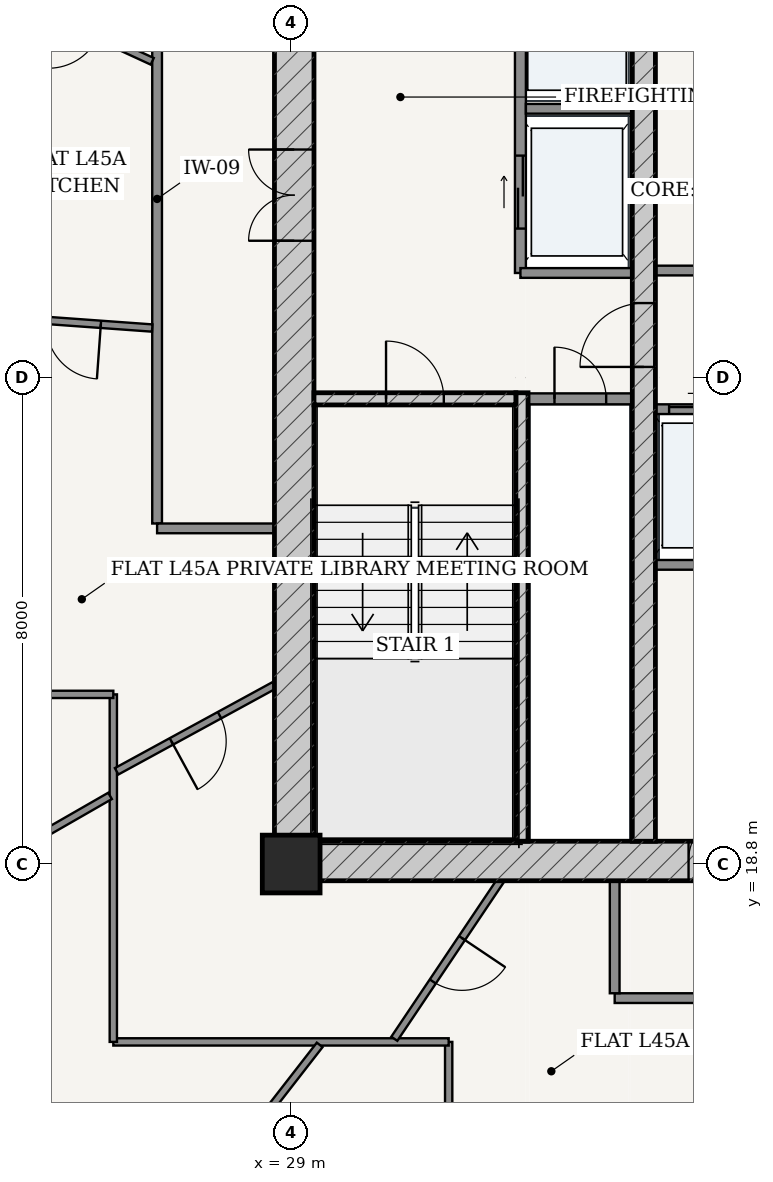
"""IFC4 building model, lengths in metres.
Left out: names, types, materials, properties, quantities, classifications, styles, units other than length and angle.
Written with IfcOpenShell. Run it as: python <this file> out.ifc"""

import sys

from ifc_helpers import new_model, si_unit, direction, frame, frame_2d, origin, origin_2d, place, context, subcontext, project, spatial, rectangle, extrude, source, transform, mapped, element, fill, save


model = new_model("IFC4")
c1 = context("Model", 3, precision=1e-05, world=origin(), true_north=direction((-0.2419218956, 0.970295726276)))
c2 = subcontext(c1, "Body", "Model", "MODEL_VIEW")
j1 = project(units=[si_unit("LENGTHUNIT", "METRE"), si_unit("PLANEANGLEUNIT", "RADIAN")], contexts=[c1])
p1 = place(None, origin())
s1 = spatial("IfcSite", under=j1, at=p1, CompositionType="ELEMENT")
p2 = place(p1, origin())
s2 = spatial("IfcBuilding", under=s1, at=p2, CompositionType="ELEMENT")
p3 = place(p2, frame((0.0, 0.0, 171.4)))
s3 = spatial("IfcBuildingStorey", under=s2, at=p3, CompositionType="ELEMENT", Elevation=171.4)
p4 = place(p3, frame((29.0, 18.8, 0.0), z_axis=(0.0, 0.0, 1.0), x_axis=(1.0, 0.0, 0.0)))
e1 = element("IfcColumn", 1, at=p4, inside=s3, PredefinedType="COLUMN", context=c2, shape_type="SweptSolid", body=[
    extrude(rectangle(XDim=0.95, YDim=0.95, at=origin_2d()), origin(), (0.0, 0.0, 1.0), 3.6),
])
p5 = place(p3, frame((28.725, 18.85, 0.0), z_axis=(0.0, 0.0, 1.0), x_axis=(1.0, 0.0, 0.0)))
e2 = element("IfcWall", 2, at=p5, inside=s3, PredefinedType="SHEAR", context=c2, shape_type="SweptSolid", body=[
    extrude(rectangle(XDim=18.55, YDim=0.65, at=frame_2d((9.275, 0.0))), origin(), (0.0, 0.0, 1.0), 3.33),
])
p6 = place(p5, frame((6.81, 0.0, 0.0)))
e3 = element("IfcOpeningElement", 3, at=p6, cuts=e2, PredefinedType="OPENING", context=c2, shape_type="SweptSolid", body=[
    extrude(rectangle(XDim=0.85, YDim=2.1, at=frame_2d((0.425, 1.05))), frame((0.0, 0.335, 0.0), z_axis=(0.0, -1.0, 0.0), x_axis=(1.0, 0.0, 0.0)), (0.0, 0.0, 1.0), 0.67),
])
p7 = place(p5, frame((8.85, 0.0, 0.0)))
e4 = element("IfcOpeningElement", 4, at=p7, cuts=e2, PredefinedType="OPENING", context=c2, shape_type="SweptSolid", body=[
    extrude(rectangle(XDim=0.85, YDim=2.1, at=frame_2d((0.425, 1.05))), frame((0.0, 0.335, 0.0), z_axis=(0.0, -1.0, 0.0), x_axis=(1.0, 0.0, 0.0)), (0.0, 0.0, 1.0), 0.67),
])
p8 = place(p5, frame((10.89, 0.0, 0.0)))
e5 = element("IfcOpeningElement", 5, at=p8, cuts=e2, PredefinedType="OPENING", context=c2, shape_type="SweptSolid", body=[
    extrude(rectangle(XDim=0.85, YDim=2.1, at=frame_2d((0.425, 1.05))), frame((0.0, 0.335, 0.0), z_axis=(0.0, -1.0, 0.0), x_axis=(1.0, 0.0, 0.0)), (0.0, 0.0, 1.0), 0.67),
])
p9 = place(p3, frame((29.05, 19.175, 0.0), z_axis=(0.0, 0.0, 1.0), x_axis=(0.0, 1.0, 0.0)))
e6 = element("IfcWall", 6, at=p9, inside=s3, PredefinedType="SHEAR", context=c2, shape_type="SweptSolid", body=[
    extrude(rectangle(XDim=15.25, YDim=0.65, at=frame_2d((7.625, 0.0))), origin(), (0.0, 0.0, 1.0), 3.33),
])
p10 = place(p9, frame((9.875, 0.0, 0.0)))
e7 = element("IfcOpeningElement", 7, at=p10, cuts=e6, PredefinedType="OPENING", context=c2, shape_type="SweptSolid", body=[
    extrude(rectangle(XDim=1.5, YDim=2.2, at=frame_2d((0.75, 1.1))), frame((0.0, 0.335, 0.0), z_axis=(0.0, -1.0, 0.0), x_axis=(1.0, 0.0, 0.0)), (0.0, 0.0, 1.0), 0.67),
])
p11 = place(p3, frame((32.795, 19.175, 0.0), z_axis=(0.0, 0.0, 1.0), x_axis=(0.0, 1.0, 0.0)))
e8 = element("IfcWall", 8, at=p11, inside=s3, PredefinedType="SOLIDWALL", context=c2, shape_type="SweptSolid", body=[
    extrude(rectangle(XDim=7.375, YDim=0.2, at=frame_2d((3.688, 0.0))), origin(), (0.0, 0.0, 1.0), 3.33),
])
p12 = place(p3, frame((29.375, 26.45, 0.0), z_axis=(0.0, 0.0, 1.0), x_axis=(1.0, 0.0, 0.0)))
e9 = element("IfcWall", 9, at=p12, inside=s3, PredefinedType="SOLIDWALL", context=c2, shape_type="SweptSolid", body=[
    extrude(rectangle(XDim=3.32, YDim=0.2, at=frame_2d((1.66, 0.0))), origin(), (0.0, 0.0, 1.0), 3.33),
])
p13 = place(p12, frame((1.185, 0.0, 0.0)))
e10 = element("IfcOpeningElement", 10, at=p13, cuts=e9, PredefinedType="OPENING", context=c2, shape_type="SweptSolid", body=[
    extrude(rectangle(XDim=0.95, YDim=2.15, at=frame_2d((0.475, 1.075))), frame((0.0, 0.11, 0.0), z_axis=(0.0, -1.0, 0.0), x_axis=(1.0, 0.0, 0.0)), (0.0, 0.0, 1.0), 0.22),
])
p14 = place(p3, frame((34.8, 19.175, 0.0), z_axis=(0.0, 0.0, 1.0), x_axis=(0.0, 1.0, 0.0)))
e11 = element("IfcWall", 11, at=p14, inside=s3, PredefinedType="SHEAR", context=c2, shape_type="SweptSolid", body=[
    extrude(rectangle(XDim=15.25, YDim=0.38, at=frame_2d((7.625, 0.0))), origin(), (0.0, 0.0, 1.0), 3.33),
])
p15 = place(p14, frame((7.8, 0.0, 0.0)))
e12 = element("IfcOpeningElement", 12, at=p15, cuts=e11, PredefinedType="OPENING", context=c2, shape_type="SweptSolid", body=[
    extrude(rectangle(XDim=1.05, YDim=2.15, at=frame_2d((0.525, 1.075))), frame((0.0, 0.2, 0.0), z_axis=(0.0, -1.0, 0.0), x_axis=(1.0, 0.0, 0.0)), (0.0, 0.0, 1.0), 0.4),
])
p16 = place(p3, frame((32.9, 26.45, 0.0), z_axis=(0.0, 0.0, 1.0), x_axis=(1.0, 0.0, 0.0)))
e13 = element("IfcWall", 13, at=p16, inside=s3, PredefinedType="PARTITIONING", context=c2, shape_type="SweptSolid", body=[
    extrude(rectangle(XDim=1.71, YDim=0.18, at=frame_2d((0.855, 0.0))), origin(), (0.0, 0.0, 1.0), 3.33),
])
p17 = place(p16, frame((0.43, 0.0, 0.0)))
e14 = element("IfcOpeningElement", 14, at=p17, cuts=e13, PredefinedType="OPENING", context=c2, shape_type="SweptSolid", body=[
    extrude(rectangle(XDim=0.85, YDim=2.1, at=frame_2d((0.425, 1.05))), frame((0.0, 0.1, 0.0), z_axis=(0.0, -1.0, 0.0), x_axis=(1.0, 0.0, 0.0)), (0.0, 0.0, 1.0), 0.2),
])
p18 = place(p3, frame((32.77, 28.52, 0.0), z_axis=(0.0, 0.0, 1.0), x_axis=(0.0, 1.0, 0.0)))
e15 = element("IfcWall", 15, at=p18, inside=s3, PredefinedType="PARTITIONING", context=c2, shape_type="SweptSolid", body=[
    extrude(rectangle(XDim=5.905, YDim=0.18, at=frame_2d((2.953, 0.0))), origin(), (0.0, 0.0, 1.0), 3.33),
])
p19 = place(p18, frame((3.655, 0.0, 0.0)))
e16 = element("IfcOpeningElement", 16, at=p19, cuts=e15, PredefinedType="OPENING", context=c2, shape_type="SweptSolid", body=[
    extrude(rectangle(XDim=1.15, YDim=2.2, at=frame_2d((0.575, 1.1))), frame((0.0, 0.1, 0.0), z_axis=(0.0, -1.0, 0.0), x_axis=(1.0, 0.0, 0.0)), (0.0, 0.0, 1.0), 0.2),
])
p20 = place(p18, frame((0.73, 0.0, 0.0)))
e17 = element("IfcOpeningElement", 17, at=p20, cuts=e15, PredefinedType="OPENING", context=c2, shape_type="SweptSolid", body=[
    extrude(rectangle(XDim=1.2, YDim=2.25, at=frame_2d((0.6, 1.125))), frame((0.0, 0.1, 0.0), z_axis=(0.0, -1.0, 0.0), x_axis=(1.0, 0.0, 0.0)), (0.0, 0.0, 1.0), 0.2),
])
p21 = place(p3, frame((32.86, 31.22, 0.0), z_axis=(0.0, 0.0, 1.0), x_axis=(1.0, 0.0, 0.0)))
e18 = element("IfcWall", 18, at=p21, inside=s3, PredefinedType="PARTITIONING", context=c2, shape_type="SweptSolid", body=[
    extrude(rectangle(XDim=1.75, YDim=0.16, at=frame_2d((0.875, 0.0))), origin(), (0.0, 0.0, 1.0), 3.33),
])
p22 = place(p3, frame((32.77, 28.52, 0.0), z_axis=(0.0, 0.0, 1.0), x_axis=(1.0, 0.0, 0.0)))
e19 = element("IfcWall", 19, at=p22, inside=s3, PredefinedType="PARTITIONING", context=c2, shape_type="SweptSolid", body=[
    extrude(rectangle(XDim=1.84, YDim=0.16, at=frame_2d((0.92, 0.0))), origin(), (0.0, 0.0, 1.0), 3.33),
])
p23 = place(p3, frame((34.99, 28.56, 0.0), z_axis=(0.0, 0.0, 1.0), x_axis=(1.0, 0.0, 0.0)))
e20 = element("IfcWall", 20, at=p23, inside=s3, PredefinedType="PARTITIONING", context=c2, shape_type="SweptSolid", body=[
    extrude(rectangle(XDim=6.02, YDim=0.16, at=frame_2d((3.01, 0.0))), origin(), (0.0, 0.0, 1.0), 3.33),
])
p24 = place(p23, frame((1.025, 0.0, 0.0)))
e21 = element("IfcOpeningElement", 21, at=p24, cuts=e20, PredefinedType="OPENING", context=c2, shape_type="SweptSolid", body=[
    extrude(rectangle(XDim=0.86, YDim=2.1, at=frame_2d((0.43, 1.05))), frame((0.0, 0.09, 0.0), z_axis=(0.0, -1.0, 0.0), x_axis=(1.0, 0.0, 0.0)), (0.0, 0.0, 1.0), 0.18),
])
p25 = place(p23, frame((4.14, 0.0, 0.0)))
e22 = element("IfcOpeningElement", 22, at=p25, cuts=e20, PredefinedType="OPENING", context=c2, shape_type="SweptSolid", body=[
    extrude(rectangle(XDim=0.85, YDim=2.1, at=frame_2d((0.425, 1.05))), frame((0.0, 0.09, 0.0), z_axis=(0.0, -1.0, 0.0), x_axis=(1.0, 0.0, 0.0)), (0.0, 0.0, 1.0), 0.18),
])
p26 = place(p3, frame((34.99, 26.28, 0.0), z_axis=(0.0, 0.0, 1.0), x_axis=(1.0, 0.0, 0.0)))
e23 = element("IfcWall", 23, at=p26, inside=s3, PredefinedType="PARTITIONING", context=c2, shape_type="SweptSolid", body=[
    extrude(rectangle(XDim=6.02, YDim=0.16, at=frame_2d((3.01, 0.0))), origin(), (0.0, 0.0, 1.0), 3.33),
])
p27 = place(p26, frame((0.225, 0.0, 0.0)))
e24 = element("IfcOpeningElement", 24, at=p27, cuts=e23, PredefinedType="OPENING", context=c2, shape_type="SweptSolid", body=[
    extrude(rectangle(XDim=1.1, YDim=2.2, at=frame_2d((0.55, 1.1))), frame((0.0, 0.09, 0.0), z_axis=(0.0, -1.0, 0.0), x_axis=(1.0, 0.0, 0.0)), (0.0, 0.0, 1.0), 0.18),
])
p28 = place(p26, frame((1.705, 0.0, 0.0)))
e25 = element("IfcOpeningElement", 25, at=p28, cuts=e23, PredefinedType="OPENING", context=c2, shape_type="SweptSolid", body=[
    extrude(rectangle(XDim=1.1, YDim=2.2, at=frame_2d((0.55, 1.1))), frame((0.0, 0.09, 0.0), z_axis=(0.0, -1.0, 0.0), x_axis=(1.0, 0.0, 0.0)), (0.0, 0.0, 1.0), 0.18),
])
p29 = place(p3, frame((34.99, 23.72, 0.0), z_axis=(0.0, 0.0, 1.0), x_axis=(1.0, 0.0, 0.0)))
e26 = element("IfcWall", 26, at=p29, inside=s3, PredefinedType="PARTITIONING", context=c2, shape_type="SweptSolid", body=[
    extrude(rectangle(XDim=6.02, YDim=0.16, at=frame_2d((3.01, 0.0))), origin(), (0.0, 0.0, 1.0), 3.33),
])
p30 = place(p3, frame((26.795, 24.4, 0.0), z_axis=(0.0, 0.0, 1.0), x_axis=(0.0, 1.0, 0.0)))
e27 = element("IfcWall", 27, at=p30, inside=s3, PredefinedType="PARTITIONING", context=c2, shape_type="SweptSolid", body=[
    extrude(rectangle(XDim=10.675, YDim=0.16, at=frame_2d((5.337, 0.0))), origin(), (0.0, 0.0, 1.0), 2.776),
])
p31 = place(p30, frame((8.514, 0.0, 0.0)))
e28 = element("IfcOpeningElement", 28, at=p31, cuts=e27, PredefinedType="OPENING", context=c2, shape_type="SweptSolid", body=[
    extrude(rectangle(XDim=0.98, YDim=2.2, at=frame_2d((0.49, 1.1))), frame((0.0, 0.09, 0.0), z_axis=(0.0, -1.0, 0.0), x_axis=(1.0, 0.0, 0.0)), (0.0, 0.0, 1.0), 0.18),
])
p32 = place(p3, frame((26.795, 24.32, 0.0), z_axis=(0.0, 0.0, 1.0), x_axis=(1.0, 0.0, 0.0)))
e29 = element("IfcWall", 29, at=p32, inside=s3, PredefinedType="PARTITIONING", context=c2, shape_type="SweptSolid", body=[
    extrude(rectangle(XDim=1.93, YDim=0.16, at=frame_2d((0.965, 0.0))), origin(), (0.0, 0.0, 1.0), 3.33),
])
p33 = place(p3, frame((34.32, 16.595, 0.0), z_axis=(0.0, 0.0, 1.0), x_axis=(1.0, 0.0, 0.0)))
e30 = element("IfcWall", 30, at=p33, inside=s3, PredefinedType="PARTITIONING", context=c2, shape_type="SweptSolid", body=[
    extrude(rectangle(XDim=14.885, YDim=0.16, at=frame_2d((7.442, 0.0))), origin(), (0.0, 0.0, 1.0), 2.776),
])
p34 = place(p33, frame((11.59, 0.0, 0.0)))
e31 = element("IfcOpeningElement", 31, at=p34, cuts=e30, PredefinedType="OPENING", context=c2, shape_type="SweptSolid", body=[
    extrude(rectangle(XDim=0.98, YDim=2.2, at=frame_2d((0.49, 1.1))), frame((0.0, 0.09, 0.0), z_axis=(0.0, -1.0, 0.0), x_axis=(1.0, 0.0, 0.0)), (0.0, 0.0, 1.0), 0.18),
])
p35 = place(p3, frame((34.32, 16.675, 0.0), z_axis=(0.0, 0.0, 1.0), x_axis=(0.0, 1.0, 0.0)))
e32 = element("IfcWall", 32, at=p35, inside=s3, PredefinedType="PARTITIONING", context=c2, shape_type="SweptSolid", body=[
    extrude(rectangle(XDim=1.85, YDim=0.16, at=frame_2d((0.925, 0.0))), origin(), (0.0, 0.0, 1.0), 3.33),
])
p36 = place(p3, frame((31.59, 13.865, 0.0), z_axis=(0.0, 0.0, 1.0), x_axis=(0.0, 1.0, 0.0)))
e33 = element("IfcWall", 33, at=p36, inside=s3, PredefinedType="PARTITIONING", context=c2, shape_type="SweptSolid", body=[
    extrude(rectangle(XDim=2.01, YDim=0.12, at=frame_2d((1.005, 0.0))), origin(), (0.0, 0.0, 1.0), 3.005),
])
p37 = place(p3, frame((31.59, 15.875, 0.0), z_axis=(0.0, 0.0, 1.0), x_axis=(-1.0, 0.0, 0.0)))
e34 = element("IfcWall", 34, at=p37, inside=s3, PredefinedType="PARTITIONING", context=c2, shape_type="SweptSolid", body=[
    extrude(rectangle(XDim=5.515, YDim=0.12, at=frame_2d((2.758, 0.0))), origin(), (0.0, 0.0, 1.0), 2.776),
])
p38 = place(p3, frame((26.075, 15.875, 0.0), z_axis=(0.0, 0.0, 1.0), x_axis=(0.0, 1.0, 0.0)))
e35 = element("IfcWall", 35, at=p38, inside=s3, PredefinedType="PARTITIONING", context=c2, shape_type="SweptSolid", body=[
    extrude(rectangle(XDim=5.715, YDim=0.12, at=frame_2d((2.857, 0.0))), origin(), (0.0, 0.0, 1.0), 2.776),
])
p39 = place(p3, frame((26.075, 21.59, 0.0), z_axis=(0.0, 0.0, 1.0), x_axis=(-1.0, 0.0, 0.0)))
e36 = element("IfcWall", 36, at=p39, inside=s3, PredefinedType="PARTITIONING", context=c2, shape_type="SweptSolid", body=[
    extrude(rectangle(XDim=2.01, YDim=0.12, at=frame_2d((1.005, 0.0))), origin(), (0.0, 0.0, 1.0), 3.33),
])
p40 = place(p3, frame((26.021, 19.921, 0.0), z_axis=(0.0, 0.0, 1.0), x_axis=(-0.867161148693, -0.498027652041, 0.0)))
e37 = element("IfcWall", 37, at=p40, inside=s3, PredefinedType="PARTITIONING", context=c2, shape_type="SweptSolid", body=[
    extrude(rectangle(XDim=9.279, YDim=0.12, at=frame_2d((4.64, 0.0))), origin(), (0.0, 0.0, 1.0), 2.776),
])
p41 = place(p40, frame((3.192, 0.0, 0.0)))
e38 = element("IfcOpeningElement", 38, at=p41, cuts=e37, PredefinedType="OPENING", context=c2, shape_type="SweptSolid", body=[
    extrude(rectangle(XDim=0.9, YDim=2.15, at=frame_2d((0.45, 1.075))), frame((0.0, 0.07, 0.0), z_axis=(0.0, -1.0, 0.0), x_axis=(1.0, 0.0, 0.0)), (0.0, 0.0, 1.0), 0.14),
])
p42 = place(p3, frame((29.469, 15.826, 0.0), z_axis=(0.0, 0.0, 1.0), x_axis=(-0.61373942367, -0.789508657225, 0.0)))
e39 = element("IfcWall", 39, at=p42, inside=s3, PredefinedType="PARTITIONING", context=c2, shape_type="SweptSolid", body=[
    extrude(rectangle(XDim=7.898, YDim=0.12, at=frame_2d((3.949, 0.0))), origin(), (0.0, 0.0, 1.0), 2.776),
])
p43 = place(p42, frame((2.5, 0.0, 0.0)))
e40 = element("IfcOpeningElement", 40, at=p43, cuts=e39, PredefinedType="OPENING", context=c2, shape_type="SweptSolid", body=[
    extrude(rectangle(XDim=0.9, YDim=2.15, at=frame_2d((0.45, 1.075))), frame((0.0, 0.07, 0.0), z_axis=(0.0, -1.0, 0.0), x_axis=(1.0, 0.0, 0.0)), (0.0, 0.0, 1.0), 0.14),
])
p44 = place(p3, frame((26.715, 32.001, 0.0), z_axis=(0.0, 0.0, 1.0), x_axis=(-0.90819942915, 0.418537688735, 0.0)))
e41 = element("IfcWall", 41, at=p44, inside=s3, PredefinedType="PARTITIONING", context=c2, shape_type="SweptSolid", body=[
    extrude(rectangle(XDim=2.856, YDim=0.12, at=frame_2d((1.428, 0.0))), origin(), (0.0, 0.0, 1.0), 3.33),
])
p45 = place(p44, frame((0.978, 0.0, 0.0)))
e42 = element("IfcOpeningElement", 42, at=p45, cuts=e41, PredefinedType="OPENING", context=c2, shape_type="SweptSolid", body=[
    extrude(rectangle(XDim=0.9, YDim=2.15, at=frame_2d((0.45, 1.075))), frame((0.0, 0.07, 0.0), z_axis=(0.0, -1.0, 0.0), x_axis=(1.0, 0.0, 0.0)), (0.0, 0.0, 1.0), 0.14),
])
p46 = place(p3, frame((26.715, 27.615, 0.0), z_axis=(0.0, 0.0, 1.0), x_axis=(-0.997406375801, 0.071975839778, 0.0)))
e43 = element("IfcWall", 43, at=p46, inside=s3, PredefinedType="PARTITIONING", context=c2, shape_type="SweptSolid", body=[
    extrude(rectangle(XDim=2.595, YDim=0.12, at=frame_2d((1.297, 0.0))), origin(), (0.0, 0.0, 1.0), 3.33),
])
p47 = place(p46, frame((0.847, 0.0, 0.0)))
e44 = element("IfcOpeningElement", 44, at=p47, cuts=e43, PredefinedType="OPENING", context=c2, shape_type="SweptSolid", body=[
    extrude(rectangle(XDim=0.9, YDim=2.15, at=frame_2d((0.45, 1.075))), frame((0.0, 0.07, 0.0), z_axis=(0.0, -1.0, 0.0), x_axis=(1.0, 0.0, 0.0)), (0.0, 0.0, 1.0), 0.14),
])
p48 = place(p3, frame((28.723, 21.74, 0.0), z_axis=(0.0, 0.0, 1.0), x_axis=(-0.877892414948, -0.47885792024, 0.0)))
e45 = element("IfcWall", 45, at=p48, inside=s3, PredefinedType="PARTITIONING", context=c2, shape_type="SweptSolid", body=[
    extrude(rectangle(XDim=2.955, YDim=0.12, at=frame_2d((1.477, 0.0))), origin(), (0.0, 0.0, 1.0), 3.33),
])
p49 = place(p48, frame((1.027, 0.0, 0.0)))
e46 = element("IfcOpeningElement", 46, at=p49, cuts=e45, PredefinedType="OPENING", context=c2, shape_type="SweptSolid", body=[
    extrude(rectangle(XDim=0.9, YDim=2.15, at=frame_2d((0.45, 1.075))), frame((0.0, 0.07, 0.0), z_axis=(0.0, -1.0, 0.0), x_axis=(1.0, 0.0, 0.0)), (0.0, 0.0, 1.0), 0.14),
])
p50 = place(p3, frame((32.441, 18.525, 0.0), z_axis=(0.0, 0.0, 1.0), x_axis=(-0.557594690071, -0.830113342625, 0.0)))
e47 = element("IfcWall", 47, at=p50, inside=s3, PredefinedType="PARTITIONING", context=c2, shape_type="SweptSolid", body=[
    extrude(rectangle(XDim=3.13, YDim=0.12, at=frame_2d((1.565, 0.0))), origin(), (0.0, 0.0, 1.0), 3.33),
])
p51 = place(p50, frame((1.135, 0.0, 0.0)))
e48 = element("IfcOpeningElement", 48, at=p51, cuts=e47, PredefinedType="OPENING", context=c2, shape_type="SweptSolid", body=[
    extrude(rectangle(XDim=0.86, YDim=2.15, at=frame_2d((0.43, 1.075))), frame((0.0, 0.07, 0.0), z_axis=(0.0, -1.0, 0.0), x_axis=(1.0, 0.0, 0.0)), (0.0, 0.0, 1.0), 0.14),
])
m1 = source(origin(), c2, "Body", "SweptSolid", [
    extrude(rectangle(XDim=1.5, YDim=2.2, at=frame_2d((0.75, 1.1))), frame((0.0, 0.025, 0.0), z_axis=(0.0, -1.0, 0.0), x_axis=(1.0, 0.0, 0.0)), (0.0, 0.0, 1.0), 0.05),
])
p52 = place(p10, origin())
e49 = element("IfcDoor", 49, at=p52, inside=s3, OperationType="DOUBLE_DOOR_SINGLE_SWING", PredefinedType="DOOR", context=c2, shape_type="MappedRepresentation", body=[
    mapped(m1, transform((0.0, 0.0, 0.0), scale=1.0)),
])
fill(e7, e49)
m2 = source(origin(), c2, "Body", "SweptSolid", [
    extrude(rectangle(XDim=1.05, YDim=2.15, at=frame_2d((0.525, 1.075))), frame((0.0, 0.025, 0.0), z_axis=(0.0, -1.0, 0.0), x_axis=(1.0, 0.0, 0.0)), (0.0, 0.0, 1.0), 0.05),
])
p53 = place(p15, origin())
e50 = element("IfcDoor", 50, at=p53, inside=s3, OperationType="SINGLE_SWING_LEFT", PredefinedType="DOOR", context=c2, shape_type="MappedRepresentation", body=[
    mapped(m2, transform((0.0, 0.0, 0.0), scale=1.0)),
])
fill(e12, e50)
m3 = source(origin(), c2, "Body", "SweptSolid", [
    extrude(rectangle(XDim=0.95, YDim=2.15, at=frame_2d((0.475, 1.075))), frame((0.0, 0.025, 0.0), z_axis=(0.0, -1.0, 0.0), x_axis=(1.0, 0.0, 0.0)), (0.0, 0.0, 1.0), 0.05),
])
p54 = place(p13, origin())
e51 = element("IfcDoor", 51, at=p54, inside=s3, OperationType="SINGLE_SWING_LEFT", PredefinedType="DOOR", context=c2, shape_type="MappedRepresentation", body=[
    mapped(m3, transform((0.0, 0.0, 0.0), scale=1.0)),
])
fill(e10, e51)
m4 = source(origin(), c2, "Body", "SweptSolid", [
    extrude(rectangle(XDim=0.85, YDim=2.1, at=frame_2d((0.425, 1.05))), frame((0.0, 0.025, 0.0), z_axis=(0.0, -1.0, 0.0), x_axis=(1.0, 0.0, 0.0)), (0.0, 0.0, 1.0), 0.05),
])
p55 = place(p17, origin())
e52 = element("IfcDoor", 52, at=p55, inside=s3, OperationType="SINGLE_SWING_LEFT", PredefinedType="DOOR", context=c2, shape_type="MappedRepresentation", body=[
    mapped(m4, transform((0.0, 0.0, 0.0), scale=1.0)),
])
fill(e14, e52)
p56 = place(p6, origin())
e53 = element("IfcDoor", 53, at=p56, inside=s3, OperationType="SINGLE_SWING_RIGHT", PredefinedType="DOOR", context=c2, shape_type="MappedRepresentation", body=[
    mapped(m4, transform((0.0, 0.0, 0.0), scale=1.0)),
])
fill(e3, e53)
m5 = source(origin(), c2, "Body", "SweptSolid", [
    extrude(rectangle(XDim=1.2, YDim=2.25, at=frame_2d((0.6, 1.125))), frame((0.0, 0.025, 0.0), z_axis=(0.0, -1.0, 0.0), x_axis=(1.0, 0.0, 0.0)), (0.0, 0.0, 1.0), 0.05),
])
p57 = place(p20, origin())
e54 = element("IfcDoor", 54, at=p57, inside=s3, OperationType="DOUBLE_DOOR_SLIDING", PredefinedType="DOOR", context=c2, shape_type="MappedRepresentation", body=[
    mapped(m5, transform((0.0, 0.0, 0.0), scale=1.0)),
])
fill(e17, e54)
m6 = source(origin(), c2, "Body", "SweptSolid", [
    extrude(rectangle(XDim=1.1, YDim=2.2, at=frame_2d((0.55, 1.1))), frame((0.0, 0.025, 0.0), z_axis=(0.0, -1.0, 0.0), x_axis=(1.0, 0.0, 0.0)), (0.0, 0.0, 1.0), 0.05),
])
p58 = place(p27, origin())
e55 = element("IfcDoor", 55, at=p58, inside=s3, OperationType="DOUBLE_DOOR_SLIDING", PredefinedType="DOOR", context=c2, shape_type="MappedRepresentation", body=[
    mapped(m6, transform((0.0, 0.0, 0.0), scale=1.0)),
])
fill(e24, e55)
m7 = source(origin(), c2, "Body", "SweptSolid", [
    extrude(rectangle(XDim=0.9, YDim=2.15, at=frame_2d((0.45, 1.075))), frame((0.0, 0.025, 0.0), z_axis=(0.0, -1.0, 0.0), x_axis=(1.0, 0.0, 0.0)), (0.0, 0.0, 1.0), 0.05),
])
p59 = place(p47, origin())
e56 = element("IfcDoor", 56, at=p59, inside=s3, OperationType="SINGLE_SWING_LEFT", PredefinedType="DOOR", context=c2, shape_type="MappedRepresentation", body=[
    mapped(m7, transform((0.0, 0.0, 0.0), scale=1.0)),
])
fill(e44, e56)
p60 = place(p49, origin())
e57 = element("IfcDoor", 57, at=p60, inside=s3, OperationType="SINGLE_SWING_RIGHT", PredefinedType="DOOR", context=c2, shape_type="MappedRepresentation", body=[
    mapped(m7, transform((0.0, 0.0, 0.0), scale=1.0)),
])
fill(e46, e57)
m8 = source(origin(), c2, "Body", "SweptSolid", [
    extrude(rectangle(XDim=0.86, YDim=2.15, at=frame_2d((0.43, 1.075))), frame((0.0, 0.025, 0.0), z_axis=(0.0, -1.0, 0.0), x_axis=(1.0, 0.0, 0.0)), (0.0, 0.0, 1.0), 0.05),
])
p61 = place(p51, origin())
e58 = element("IfcDoor", 58, at=p61, inside=s3, OperationType="SINGLE_SWING_LEFT", PredefinedType="DOOR", context=c2, shape_type="MappedRepresentation", body=[
    mapped(m8, transform((0.0, 0.0, 0.0), scale=1.0)),
])
fill(e48, e58)
save(model, sys.argv[1])
